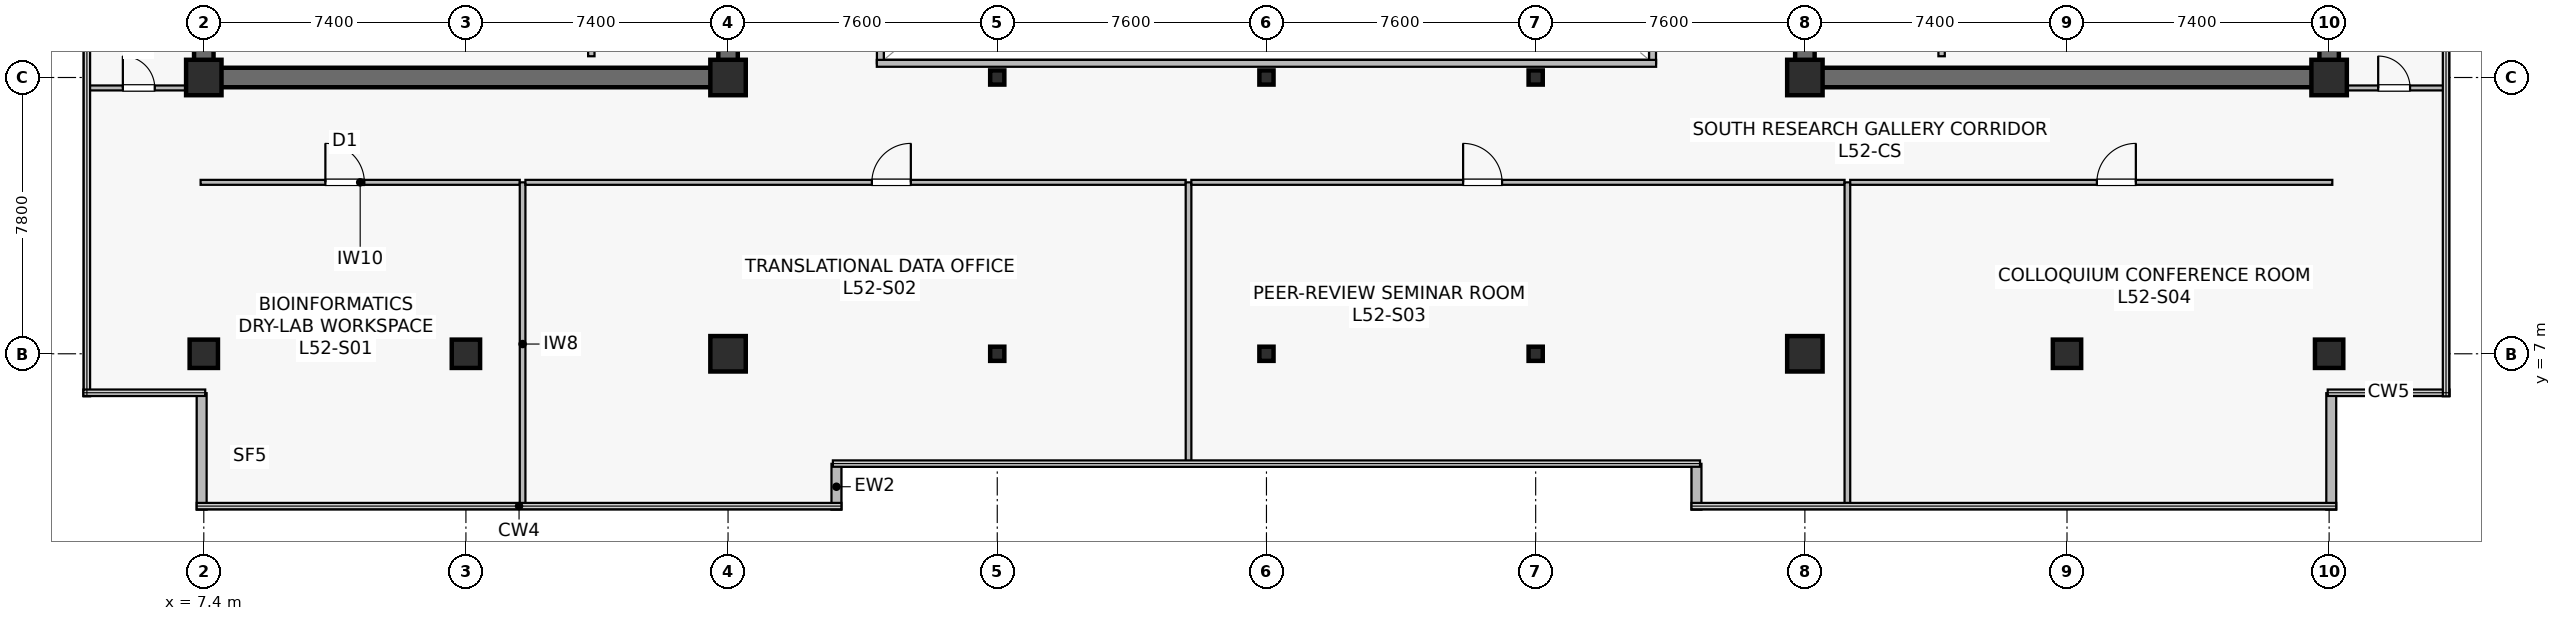
"""IFC4 building model, lengths in metres.
Left out: names, types, materials, properties, quantities, classifications, styles, units other than length and angle.
Written with IfcOpenShell. Run it as: python <this file> out.ifc"""

import sys

from ifc_helpers import new_model, si_unit, direction, frame, frame_2d, origin, origin_2d, place, context, subcontext, project, spatial, rectangle, hollow_rectangle, extrude, source, transform, mapped, element, fill, save


model = new_model("IFC4")
c1 = context("Model", 3, precision=1e-05, world=origin(), true_north=direction((0.0, 1.0)))
c2 = subcontext(c1, "Body", "Model", "MODEL_VIEW")
j1 = project(units=[si_unit("LENGTHUNIT", "METRE"), si_unit("PLANEANGLEUNIT", "RADIAN")], contexts=[c1])
p1 = place(None, origin())
s1 = spatial("IfcSite", under=j1, at=p1, CompositionType="ELEMENT")
p2 = place(p1, origin())
s2 = spatial("IfcBuilding", under=s1, at=p2, CompositionType="ELEMENT")
p3 = place(p2, frame((0.0, 0.0, 217.8)))
s3 = spatial("IfcBuildingStorey", under=s2, at=p3, CompositionType="ELEMENT", Elevation=217.8)
p4 = place(p3, frame((7.125, 14.8, 0.0), z_axis=(0.0, 0.0, 1.0), x_axis=(1.0, 0.0, 0.0)))
e1 = element("IfcWall", 1, at=p4, inside=s3, PredefinedType="SHEAR", context=c2, shape_type="SweptSolid", body=[
    extrude(rectangle(XDim=15.35, YDim=0.55, at=frame_2d((7.675, 0.0))), origin(), (0.0, 0.0, 1.0), 3.8),
])
p5 = place(p3, frame((7.4, 15.075, 0.0), z_axis=(0.0, 0.0, 1.0), x_axis=(0.0, 1.0, 0.0)))
e2 = element("IfcWall", 2, at=p5, inside=s3, PredefinedType="SHEAR", context=c2, shape_type="SweptSolid", body=[
    extrude(rectangle(XDim=18.45, YDim=0.55, at=frame_2d((9.225, 0.0))), origin(), (0.0, 0.0, 1.0), 3.8),
])
p6 = place(p3, frame((22.2, 15.075, 0.0), z_axis=(0.0, 0.0, 1.0), x_axis=(0.0, 1.0, 0.0)))
e3 = element("IfcWall", 3, at=p6, inside=s3, PredefinedType="SHEAR", context=c2, shape_type="SweptSolid", body=[
    extrude(rectangle(XDim=18.45, YDim=0.55, at=frame_2d((9.225, 0.0))), origin(), (0.0, 0.0, 1.0), 3.8),
])
p7 = place(p6, frame((3.475, 0.0, 0.0)))
e4 = element("IfcOpeningElement", 4, at=p7, cuts=e3, PredefinedType="OPENING", context=c2, shape_type="SweptSolid", body=[
    extrude(rectangle(XDim=1.42, YDim=2.2, at=frame_2d((0.71, 1.1))), frame((0.0, 0.285, 0.0), z_axis=(0.0, -1.0, 0.0), x_axis=(1.0, 0.0, 0.0)), (0.0, 0.0, 1.0), 0.57),
])
p8 = place(p3, frame((52.325, 14.8, 0.0), z_axis=(0.0, 0.0, 1.0), x_axis=(1.0, 0.0, 0.0)))
e5 = element("IfcWall", 5, at=p8, inside=s3, PredefinedType="SHEAR", context=c2, shape_type="SweptSolid", body=[
    extrude(rectangle(XDim=15.35, YDim=0.55, at=frame_2d((7.675, 0.0))), origin(), (0.0, 0.0, 1.0), 3.8),
])
p9 = place(p3, frame((52.6, 15.075, 0.0), z_axis=(0.0, 0.0, 1.0), x_axis=(0.0, 1.0, 0.0)))
e6 = element("IfcWall", 6, at=p9, inside=s3, PredefinedType="SHEAR", context=c2, shape_type="SweptSolid", body=[
    extrude(rectangle(XDim=18.45, YDim=0.55, at=frame_2d((9.225, 0.0))), origin(), (0.0, 0.0, 1.0), 3.8),
])
p10 = place(p9, frame((3.475, 0.0, 0.0)))
e7 = element("IfcOpeningElement", 7, at=p10, cuts=e6, PredefinedType="OPENING", context=c2, shape_type="SweptSolid", body=[
    extrude(rectangle(XDim=1.42, YDim=2.2, at=frame_2d((0.71, 1.1))), frame((0.0, 0.285, 0.0), z_axis=(0.0, -1.0, 0.0), x_axis=(1.0, 0.0, 0.0)), (0.0, 0.0, 1.0), 0.57),
])
p11 = place(p3, frame((67.4, 15.075, 0.0), z_axis=(0.0, 0.0, 1.0), x_axis=(0.0, 1.0, 0.0)))
e8 = element("IfcWall", 8, at=p11, inside=s3, PredefinedType="SHEAR", context=c2, shape_type="SweptSolid", body=[
    extrude(rectangle(XDim=18.45, YDim=0.55, at=frame_2d((9.225, 0.0))), origin(), (0.0, 0.0, 1.0), 3.8),
])
m1 = source(origin(), c2, "Body", "SweptSolid", [
    extrude(rectangle(XDim=0.8, YDim=0.8, at=origin_2d()), origin(), (0.0, 0.0, 1.0), 4.1),
])
p12 = place(p3, frame((14.8, 7.0, 0.0), z_axis=(0.0, 0.0, 1.0), x_axis=(1.0, 0.0, 0.0)))
e9 = element("IfcColumn", 9, at=p12, inside=s3, PredefinedType="COLUMN", context=c2, shape_type="MappedRepresentation", body=[
    mapped(m1, transform((0.0, 0.0, 0.0), scale=1.0)),
])
m2 = source(origin(), c2, "Body", "SweptSolid", [
    extrude(rectangle(XDim=1.0, YDim=1.0, at=origin_2d()), origin(), (0.0, 0.0, 1.0), 4.1),
])
for number, where, z_axis, x_axis in (
    (10, (22.2, 7.0, 0.0), (0.0, 0.0, 1.0), (1.0, 0.0, 0.0)),
    (11, (7.4, 14.8, 0.0), (0.0, 0.0, 1.0), (1.0, 0.0, 0.0)),
    (12, (22.2, 14.8, 0.0), (0.0, 0.0, 1.0), (1.0, 0.0, 0.0)),
    (13, (52.6, 7.0, 0.0), (0.0, 0.0, 1.0), (1.0, 0.0, 0.0)),
):
    element("IfcColumn", number, at=place(p3, frame(where, z_axis=z_axis, x_axis=x_axis)), inside=s3, PredefinedType="COLUMN", context=c2, shape_type="MappedRepresentation", body=[
        mapped(m2, transform((0.0, 0.0, 0.0), scale=1.0)),
    ])
p13 = place(p3, frame((60.0, 7.0, 0.0), z_axis=(0.0, 0.0, 1.0), x_axis=(1.0, 0.0, 0.0)))
e14 = element("IfcColumn", 14, at=p13, inside=s3, PredefinedType="COLUMN", context=c2, shape_type="MappedRepresentation", body=[
    mapped(m1, transform((0.0, 0.0, 0.0), scale=1.0)),
])
for number, where, z_axis, x_axis in (
    (15, (52.6, 14.8, 0.0), (0.0, 0.0, 1.0), (1.0, 0.0, 0.0)),
    (16, (67.4, 14.8, 0.0), (0.0, 0.0, 1.0), (1.0, 0.0, 0.0)),
):
    element("IfcColumn", number, at=place(p3, frame(where, z_axis=z_axis, x_axis=x_axis)), inside=s3, PredefinedType="COLUMN", context=c2, shape_type="MappedRepresentation", body=[
        mapped(m2, transform((0.0, 0.0, 0.0), scale=1.0)),
    ])
for number, where, z_axis, x_axis in (
    (17, (7.4, 7.0, 0.0), (0.0, 0.0, 1.0), (1.0, 0.0, 0.0)),
    (18, (67.4, 7.0, 0.0), (0.0, 0.0, 1.0), (1.0, 0.0, 0.0)),
):
    element("IfcColumn", number, at=place(p3, frame(where, z_axis=z_axis, x_axis=x_axis)), inside=s3, PredefinedType="COLUMN", context=c2, shape_type="MappedRepresentation", body=[
        mapped(m1, transform((0.0, 0.0, 0.0), scale=1.0)),
    ])
m3 = source(origin(), c2, "Body", "SweptSolid", [
    extrude(hollow_rectangle(XDim=0.4, YDim=0.4, WallThickness=0.019, at=origin_2d()), origin(), (0.0, 0.0, 1.0), 4.1),
])
for number, where, z_axis, x_axis in (
    (19, (29.8, 7.0, 0.0), (0.0, 0.0, 1.0), (1.0, 0.0, 0.0)),
    (20, (29.8, 14.8, 0.0), (0.0, 0.0, 1.0), (1.0, 0.0, 0.0)),
    (21, (37.4, 7.0, 0.0), (0.0, 0.0, 1.0), (1.0, 0.0, 0.0)),
    (22, (37.4, 14.8, 0.0), (0.0, 0.0, 1.0), (1.0, 0.0, 0.0)),
    (23, (45.0, 7.0, 0.0), (0.0, 0.0, 1.0), (1.0, 0.0, 0.0)),
    (24, (45.0, 14.8, 0.0), (0.0, 0.0, 1.0), (1.0, 0.0, 0.0)),
):
    element("IfcColumn", number, at=place(p3, frame(where, z_axis=z_axis, x_axis=x_axis)), inside=s3, PredefinedType="COLUMN", context=c2, shape_type="MappedRepresentation", body=[
        mapped(m3, transform((0.0, 0.0, 0.0), scale=1.0)),
    ])
for number, where, z_axis, x_axis in (
    (25, (25.26, 2.6, 0.0), (0.0, 0.0, 1.0), (0.0, 1.0, 0.0)),
    (26, (49.54, 3.893, 0.0), (0.0, 0.0, 1.0), (0.0, -1.0, 0.0)),
):
    element("IfcWall", number, at=place(p3, frame(where, z_axis=z_axis, x_axis=x_axis)), inside=s3, PredefinedType="STANDARD", context=c2, shape_type="SweptSolid", body=[
        extrude(rectangle(XDim=1.293, YDim=0.28, at=frame_2d((0.646, 0.0))), origin(), (0.0, 0.0, 1.0), 3.8),
    ])
for number, where, z_axis, x_axis in (
    (27, (67.46, 2.6, 0.0), (0.0, 0.0, 1.0), (0.0, 1.0, 0.0)),
    (28, (7.34, 5.888, 0.0), (0.0, 0.0, 1.0), (0.0, -1.0, 0.0)),
):
    element("IfcWall", number, at=place(p3, frame(where, z_axis=z_axis, x_axis=x_axis)), inside=s3, PredefinedType="STANDARD", context=c2, shape_type="SweptSolid", body=[
        extrude(rectangle(XDim=3.288, YDim=0.28, at=frame_2d((1.644, 0.0))), origin(), (0.0, 0.0, 1.0), 3.8),
    ])
for number, where, z_axis, x_axis in (
    (29, (18.34, 15.4, 0.0), (0.0, 0.0, 1.0), (0.0, 1.0, 0.0)),
    (30, (56.46, 15.4, 0.0), (0.0, 0.0, 1.0), (0.0, 1.0, 0.0)),
):
    element("IfcWall", number, at=place(p3, frame(where, z_axis=z_axis, x_axis=x_axis)), inside=s3, PredefinedType="SOLIDWALL", context=c2, shape_type="SweptSolid", body=[
        extrude(rectangle(XDim=2.4, YDim=0.18, at=frame_2d((1.2, 0.0))), origin(), (0.0, 0.0, 1.0), 3.8),
    ])
p14 = place(p3, frame((26.5, 15.2, 0.0), z_axis=(0.0, 0.0, 1.0), x_axis=(0.0, 1.0, 0.0)))
e31 = element("IfcWall", 31, at=p14, inside=s3, PredefinedType="SOLIDWALL", context=c2, shape_type="SweptSolid", body=[
    extrude(rectangle(XDim=18.2, YDim=0.195, at=frame_2d((9.1, 0.0))), origin(), (0.0, 0.0, 1.0), 3.8),
])
p15 = place(p14, frame((1.8, 0.0, 0.9)))
e32 = element("IfcOpeningElement", 32, at=p15, cuts=e31, PredefinedType="OPENING", context=c2, shape_type="SweptSolid", body=[
    extrude(rectangle(XDim=1.5, YDim=1.4, at=frame_2d((0.75, 0.7))), frame((0.0, 0.107, 0.0), z_axis=(0.0, -1.0, 0.0), x_axis=(1.0, 0.0, 0.0)), (0.0, 0.0, 1.0), 0.215),
])
p16 = place(p14, frame((13.2, 0.0, 0.9)))
e33 = element("IfcOpeningElement", 33, at=p16, cuts=e31, PredefinedType="OPENING", context=c2, shape_type="SweptSolid", body=[
    extrude(rectangle(XDim=1.5, YDim=1.4, at=frame_2d((0.75, 0.7))), frame((0.0, 0.107, 0.0), z_axis=(0.0, -1.0, 0.0), x_axis=(1.0, 0.0, 0.0)), (0.0, 0.0, 1.0), 0.215),
])
p17 = place(p3, frame((48.3, 15.2, 0.0), z_axis=(0.0, 0.0, 1.0), x_axis=(0.0, 1.0, 0.0)))
e34 = element("IfcWall", 34, at=p17, inside=s3, PredefinedType="SOLIDWALL", context=c2, shape_type="SweptSolid", body=[
    extrude(rectangle(XDim=18.2, YDim=0.195, at=frame_2d((9.1, 0.0))), origin(), (0.0, 0.0, 1.0), 3.8),
])
p18 = place(p17, frame((1.8, 0.0, 0.9)))
e35 = element("IfcOpeningElement", 35, at=p18, cuts=e34, PredefinedType="OPENING", context=c2, shape_type="SweptSolid", body=[
    extrude(rectangle(XDim=1.5, YDim=1.4, at=frame_2d((0.75, 0.7))), frame((0.0, 0.107, 0.0), z_axis=(0.0, -1.0, 0.0), x_axis=(1.0, 0.0, 0.0)), (0.0, 0.0, 1.0), 0.215),
])
p19 = place(p17, frame((13.2, 0.0, 0.9)))
e36 = element("IfcOpeningElement", 36, at=p19, cuts=e34, PredefinedType="OPENING", context=c2, shape_type="SweptSolid", body=[
    extrude(rectangle(XDim=1.5, YDim=1.4, at=frame_2d((0.75, 0.7))), frame((0.0, 0.107, 0.0), z_axis=(0.0, -1.0, 0.0), x_axis=(1.0, 0.0, 0.0)), (0.0, 0.0, 1.0), 0.215),
])
p20 = place(p3, frame((26.4, 15.2, 0.0), z_axis=(0.0, 0.0, 1.0), x_axis=(1.0, 0.0, 0.0)))
e37 = element("IfcWall", 37, at=p20, inside=s3, PredefinedType="SOLIDWALL", context=c2, shape_type="SweptSolid", body=[
    extrude(rectangle(XDim=22.0, YDim=0.195, at=frame_2d((11.0, 0.0))), origin(), (0.0, 0.0, 1.0), 3.8),
])
p21 = place(p3, frame((7.31, 11.84, 0.0), z_axis=(0.0, 0.0, 1.0), x_axis=(1.0, 0.0, 0.0)))
e38 = element("IfcWall", 38, at=p21, inside=s3, PredefinedType="PARTITIONING", context=c2, shape_type="SweptSolid", body=[
    extrude(rectangle(XDim=9.01, YDim=0.14, at=frame_2d((4.505, 0.0))), origin(), (0.0, 0.0, 1.0), 3.197),
])
p22 = place(p21, frame((3.522, 0.0, 0.0)))
e39 = element("IfcOpeningElement", 39, at=p22, cuts=e38, PredefinedType="OPENING", context=c2, shape_type="SweptSolid", body=[
    extrude(rectangle(XDim=1.1, YDim=2.18, at=frame_2d((0.55, 1.09))), frame((0.0, 0.08, 0.0), z_axis=(0.0, -1.0, 0.0), x_axis=(1.0, 0.0, 0.0)), (0.0, 0.0, 1.0), 0.16),
])
p23 = place(p3, frame((16.4, 2.71, 0.0), z_axis=(0.0, 0.0, 1.0), x_axis=(0.0, 1.0, 0.0)))
e40 = element("IfcWall", 40, at=p23, inside=s3, PredefinedType="PARTITIONING", context=c2, shape_type="SweptSolid", body=[
    extrude(rectangle(XDim=9.13, YDim=0.16, at=frame_2d((4.565, 0.0))), origin(), (0.0, 0.0, 1.0), 3.135),
])
p24 = place(p3, frame((16.48, 11.84, 0.0), z_axis=(0.0, 0.0, 1.0), x_axis=(1.0, 0.0, 0.0)))
e41 = element("IfcWall", 41, at=p24, inside=s3, PredefinedType="PARTITIONING", context=c2, shape_type="SweptSolid", body=[
    extrude(rectangle(XDim=18.64, YDim=0.14, at=frame_2d((9.32, 0.0))), origin(), (0.0, 0.0, 1.0), 3.197),
])
p25 = place(p24, frame((9.781, 0.0, 0.0)))
e42 = element("IfcOpeningElement", 42, at=p25, cuts=e41, PredefinedType="OPENING", context=c2, shape_type="SweptSolid", body=[
    extrude(rectangle(XDim=1.1, YDim=2.18, at=frame_2d((0.55, 1.09))), frame((0.0, 0.08, 0.0), z_axis=(0.0, -1.0, 0.0), x_axis=(1.0, 0.0, 0.0)), (0.0, 0.0, 1.0), 0.16),
])
p26 = place(p3, frame((35.2, 3.91, 0.0), z_axis=(0.0, 0.0, 1.0), x_axis=(0.0, 1.0, 0.0)))
e43 = element("IfcWall", 43, at=p26, inside=s3, PredefinedType="PARTITIONING", context=c2, shape_type="SweptSolid", body=[
    extrude(rectangle(XDim=7.93, YDim=0.16, at=frame_2d((3.965, 0.0))), origin(), (0.0, 0.0, 1.0), 3.135),
])
p27 = place(p3, frame((35.28, 11.84, 0.0), z_axis=(0.0, 0.0, 1.0), x_axis=(1.0, 0.0, 0.0)))
e44 = element("IfcWall", 44, at=p27, inside=s3, PredefinedType="PARTITIONING", context=c2, shape_type="SweptSolid", body=[
    extrude(rectangle(XDim=18.44, YDim=0.14, at=frame_2d((9.22, 0.0))), origin(), (0.0, 0.0, 1.0), 3.197),
])
p28 = place(p27, frame((7.672, 0.0, 0.0)))
e45 = element("IfcOpeningElement", 45, at=p28, cuts=e44, PredefinedType="OPENING", context=c2, shape_type="SweptSolid", body=[
    extrude(rectangle(XDim=1.1, YDim=2.18, at=frame_2d((0.55, 1.09))), frame((0.0, 0.08, 0.0), z_axis=(0.0, -1.0, 0.0), x_axis=(1.0, 0.0, 0.0)), (0.0, 0.0, 1.0), 0.16),
])
p29 = place(p3, frame((53.8, 2.71, 0.0), z_axis=(0.0, 0.0, 1.0), x_axis=(0.0, 1.0, 0.0)))
e46 = element("IfcWall", 46, at=p29, inside=s3, PredefinedType="PARTITIONING", context=c2, shape_type="SweptSolid", body=[
    extrude(rectangle(XDim=9.13, YDim=0.16, at=frame_2d((4.565, 0.0))), origin(), (0.0, 0.0, 1.0), 3.135),
])
p30 = place(p3, frame((53.88, 11.84, 0.0), z_axis=(0.0, 0.0, 1.0), x_axis=(1.0, 0.0, 0.0)))
e47 = element("IfcWall", 47, at=p30, inside=s3, PredefinedType="PARTITIONING", context=c2, shape_type="SweptSolid", body=[
    extrude(rectangle(XDim=13.61, YDim=0.14, at=frame_2d((6.805, 0.0))), origin(), (0.0, 0.0, 1.0), 3.197),
])
p31 = place(p30, frame((6.964, 0.0, 0.0)))
e48 = element("IfcOpeningElement", 48, at=p31, cuts=e47, PredefinedType="OPENING", context=c2, shape_type="SweptSolid", body=[
    extrude(rectangle(XDim=1.1, YDim=2.18, at=frame_2d((0.55, 1.09))), frame((0.0, 0.08, 0.0), z_axis=(0.0, -1.0, 0.0), x_axis=(1.0, 0.0, 0.0)), (0.0, 0.0, 1.0), 0.16),
])
p32 = place(p3, frame((4.11, 14.505, 0.0), z_axis=(0.0, 0.0, 1.0), x_axis=(1.0, 0.0, 0.0)))
e49 = element("IfcWall", 49, at=p32, inside=s3, PredefinedType="PARTITIONING", context=c2, shape_type="SweptSolid", body=[
    extrude(rectangle(XDim=2.91, YDim=0.14, at=frame_2d((1.455, 0.0))), origin(), (0.0, 0.0, 1.0), 3.8),
])
p33 = place(p32, frame((1.005, 0.0, 0.0)))
e50 = element("IfcOpeningElement", 50, at=p33, cuts=e49, PredefinedType="OPENING", context=c2, shape_type="SweptSolid", body=[
    extrude(rectangle(XDim=0.9, YDim=2.1, at=frame_2d((0.45, 1.05))), frame((0.0, 0.08, 0.0), z_axis=(0.0, -1.0, 0.0), x_axis=(1.0, 0.0, 0.0)), (0.0, 0.0, 1.0), 0.16),
])
p34 = place(p3, frame((67.78, 14.505, 0.0), z_axis=(0.0, 0.0, 1.0), x_axis=(1.0, 0.0, 0.0)))
e51 = element("IfcWall", 51, at=p34, inside=s3, PredefinedType="PARTITIONING", context=c2, shape_type="SweptSolid", body=[
    extrude(rectangle(XDim=2.91, YDim=0.14, at=frame_2d((1.455, 0.0))), origin(), (0.0, 0.0, 1.0), 3.8),
])
p35 = place(p34, frame((1.005, 0.0, 0.0)))
e52 = element("IfcOpeningElement", 52, at=p35, cuts=e51, PredefinedType="OPENING", context=c2, shape_type="SweptSolid", body=[
    extrude(rectangle(XDim=0.9, YDim=2.1, at=frame_2d((0.45, 1.05))), frame((0.0, 0.08, 0.0), z_axis=(0.0, -1.0, 0.0), x_axis=(1.0, 0.0, 0.0)), (0.0, 0.0, 1.0), 0.16),
])
m4 = source(origin(), c2, "Body", "SweptSolid", [
    extrude(rectangle(XDim=1.1, YDim=2.18, at=frame_2d((0.55, 1.09))), frame((0.0, 0.025, 0.0), z_axis=(0.0, -1.0, 0.0), x_axis=(1.0, 0.0, 0.0)), (0.0, 0.0, 1.0), 0.05),
])
p36 = place(p22, origin())
e53 = element("IfcDoor", 53, at=p36, inside=s3, OperationType="SINGLE_SWING_LEFT", PredefinedType="DOOR", context=c2, shape_type="MappedRepresentation", body=[
    mapped(m4, transform((0.0, 0.0, 0.0), scale=1.0)),
])
fill(e39, e53)
p37 = place(p25, origin())
e54 = element("IfcDoor", 54, at=p37, inside=s3, OperationType="SINGLE_SWING_RIGHT", PredefinedType="DOOR", context=c2, shape_type="MappedRepresentation", body=[
    mapped(m4, transform((0.0, 0.0, 0.0), scale=1.0)),
])
fill(e42, e54)
p38 = place(p28, origin())
e55 = element("IfcDoor", 55, at=p38, inside=s3, OperationType="SINGLE_SWING_LEFT", PredefinedType="DOOR", context=c2, shape_type="MappedRepresentation", body=[
    mapped(m4, transform((0.0, 0.0, 0.0), scale=1.0)),
])
fill(e45, e55)
p39 = place(p31, origin())
e56 = element("IfcDoor", 56, at=p39, inside=s3, OperationType="SINGLE_SWING_RIGHT", PredefinedType="DOOR", context=c2, shape_type="MappedRepresentation", body=[
    mapped(m4, transform((0.0, 0.0, 0.0), scale=1.0)),
])
fill(e48, e56)
m5 = source(origin(), c2, "Body", "SweptSolid", [
    extrude(rectangle(XDim=0.9, YDim=2.1, at=frame_2d((0.45, 1.05))), frame((0.0, 0.025, 0.0), z_axis=(0.0, -1.0, 0.0), x_axis=(1.0, 0.0, 0.0)), (0.0, 0.0, 1.0), 0.05),
])
p40 = place(p33, origin())
e57 = element("IfcDoor", 57, at=p40, inside=s3, OperationType="SINGLE_SWING_LEFT", PredefinedType="DOOR", context=c2, shape_type="MappedRepresentation", body=[
    mapped(m5, transform((0.0, 0.0, 0.0), scale=1.0)),
])
fill(e50, e57)
p41 = place(p35, origin())
e58 = element("IfcDoor", 58, at=p41, inside=s3, OperationType="SINGLE_SWING_LEFT", PredefinedType="DOOR", context=c2, shape_type="MappedRepresentation", body=[
    mapped(m5, transform((0.0, 0.0, 0.0), scale=1.0)),
])
fill(e52, e58)
save(model, sys.argv[1])
